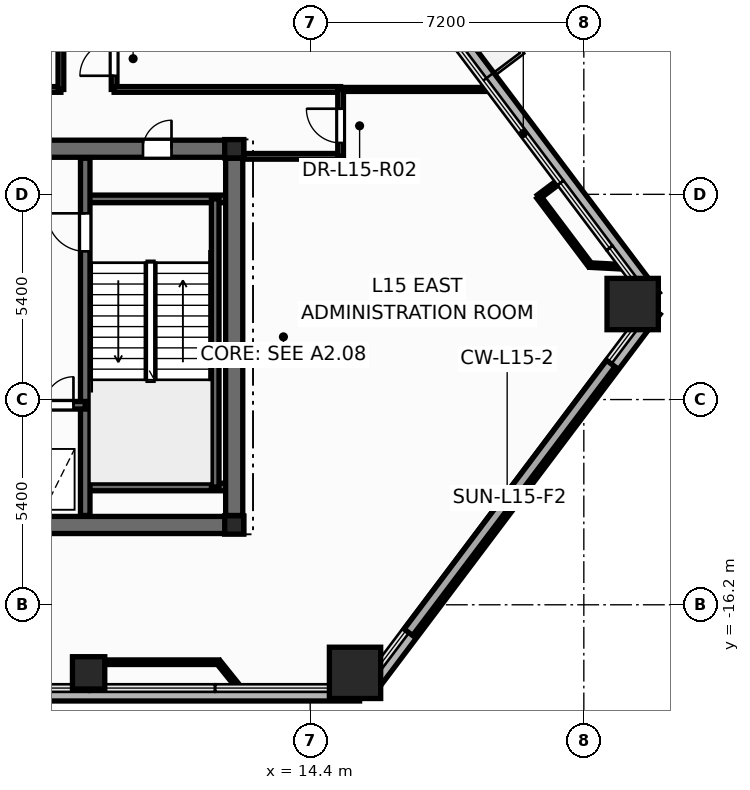
"""IFC4 building model, lengths in metres.
Left out: names, types, materials, properties, quantities, classifications, styles, units other than length and angle.
Written with IfcOpenShell. Run it as: python <this file> out.ifc"""

import sys

from ifc_helpers import new_model, si_unit, direction, frame, frame_2d, origin, origin_2d, place, context, subcontext, project, spatial, rectangle, hollow_rectangle, hollow_circle, i_section, extrude, element, fill, save


model = new_model("IFC4")
c1 = context("Model", 3, precision=1e-05, world=origin(), true_north=direction((0.0, 1.0)))
c2 = subcontext(c1, "Body", "Model", "MODEL_VIEW")
j1 = project(units=[si_unit("LENGTHUNIT", "METRE"), si_unit("PLANEANGLEUNIT", "RADIAN")], contexts=[c1])
p1 = place(None, origin())
s1 = spatial("IfcSite", under=j1, at=p1, CompositionType="ELEMENT")
p2 = place(p1, origin())
s2 = spatial("IfcBuilding", under=s1, at=p2, CompositionType="ELEMENT")
p3 = place(p2, frame((0.0, 0.0, 60.3)))
s3 = spatial("IfcBuildingStorey", under=s2, at=p3, CompositionType="ELEMENT", Elevation=60.3)
for number, where, z_axis, x_axis in (
    (1, (15.58, -17.991, 0.0), (0.0, 0.0, 1.0), (1.0, 0.0, 0.0)),
    (2, (22.885, -8.287, 0.0), (0.0, 0.0, 1.0), (1.0, 0.0, 0.0)),
):
    element("IfcColumn", number, at=place(p3, frame(where, z_axis=z_axis, x_axis=x_axis)), inside=s3, PredefinedType="COLUMN", context=c2, shape_type="SweptSolid", body=[
        extrude(hollow_rectangle(XDim=1.35, YDim=1.35, WallThickness=0.065, at=origin_2d()), origin(), (0.0, 0.0, 1.0), 4.5),
    ])
p4 = place(p3, frame((8.569, -17.991, 0.0), z_axis=(0.0, 0.0, 1.0), x_axis=(1.0, 0.0, 0.0)))
e3 = element("IfcColumn", 3, at=p4, inside=s3, PredefinedType="COLUMN", context=c2, shape_type="SweptSolid", body=[
    extrude(hollow_circle(Radius=0.425, WallThickness=0.038, at=origin_2d()), origin(), (0.0, 0.0, 1.0), 4.5),
])
for number, where, z_axis, x_axis in (
    (4, (12.4, -14.1, 0.0), (0.0, 0.0, 1.0), (1.0, 0.0, 0.0)),
    (5, (12.4, -4.2, 0.0), (0.0, 0.0, 1.0), (1.0, 0.0, 0.0)),
):
    element("IfcColumn", number, at=place(p3, frame(where, z_axis=z_axis, x_axis=x_axis)), inside=s3, PredefinedType="COLUMN", context=c2, shape_type="SweptSolid", body=[
        extrude(i_section(OverallWidth=0.5, OverallDepth=0.482, WebThickness=0.04, FlangeThickness=0.045, at=origin_2d()), origin(), (0.0, 0.0, 1.0), 4.5),
    ])
p5 = place(p3, frame((-15.699, -18.551, -0.2), z_axis=(0.0, 0.0, 1.0), x_axis=(1.0, 0.0, 0.0)))
e6 = element("IfcWall", 6, at=p5, inside=s3, PredefinedType="PARAPET", context=c2, shape_type="SweptSolid", body=[
    extrude(rectangle(XDim=31.398, YDim=0.36, at=frame_2d((15.699, 0.0))), origin(), (0.0, 0.0, 1.0), 0.38),
])
p6 = place(p3, frame((15.955, -18.423, -0.2), z_axis=(0.0, 0.0, 1.0), x_axis=(0.601450438874, 0.798910113579, 0.0)))
e7 = element("IfcWall", 7, at=p6, inside=s3, PredefinedType="PARAPET", context=c2, shape_type="SweptSolid", body=[
    extrude(rectangle(XDim=12.488, YDim=0.36, at=frame_2d((6.244, 0.0))), origin(), (0.0, 0.0, 1.0), 0.38),
])
p7 = place(p3, frame((23.442, -8.094, -0.2), z_axis=(0.0, 0.0, 1.0), x_axis=(-0.601441347289, 0.798916957994, 0.0)))
e8 = element("IfcWall", 8, at=p7, inside=s3, PredefinedType="PARAPET", context=c2, shape_type="SweptSolid", body=[
    extrude(rectangle(XDim=10.996, YDim=0.36, at=frame_2d((5.498, 0.0))), origin(), (0.0, 0.0, 1.0), 0.38),
])
p8 = place(p3, frame((-12.65, -14.1, 0.0), z_axis=(0.0, 0.0, 1.0), x_axis=(1.0, 0.0, 0.0)))
e9 = element("IfcWall", 9, at=p8, inside=s3, PredefinedType="SHEAR", context=c2, shape_type="SweptSolid", body=[
    extrude(rectangle(XDim=25.3, YDim=0.45, at=frame_2d((12.65, 0.0))), origin(), (0.0, 0.0, 1.0), 4.5),
])
p9 = place(p3, frame((-12.65, -4.2, 0.0), z_axis=(0.0, 0.0, 1.0), x_axis=(1.0, 0.0, 0.0)))
e10 = element("IfcWall", 10, at=p9, inside=s3, PredefinedType="SHEAR", context=c2, shape_type="SweptSolid", body=[
    extrude(rectangle(XDim=25.3, YDim=0.45, at=frame_2d((12.65, 0.0))), origin(), (0.0, 0.0, 1.0), 4.5),
])
p10 = place(p9, frame((1.85, 0.0, 0.0)))
e11 = element("IfcOpeningElement", 11, at=p10, cuts=e10, PredefinedType="OPENING", context=c2, shape_type="SweptSolid", body=[
    extrude(rectangle(XDim=0.756, YDim=2.054, at=frame_2d((0.375, 1.027))), frame((0.0, 0.235, 0.0), z_axis=(0.0, -1.0, 0.0), x_axis=(1.0, 0.0, 0.0)), (0.0, 0.0, 1.0), 0.47),
])
p11 = place(p9, frame((22.65, 0.0, 0.0)))
e12 = element("IfcOpeningElement", 12, at=p11, cuts=e10, PredefinedType="OPENING", context=c2, shape_type="SweptSolid", body=[
    extrude(rectangle(XDim=0.756, YDim=2.054, at=frame_2d((0.375, 1.027))), frame((0.0, 0.235, 0.0), z_axis=(0.0, -1.0, 0.0), x_axis=(1.0, 0.0, 0.0)), (0.0, 0.0, 1.0), 0.47),
])
p12 = place(p9, frame((5.85, 0.0, 0.0)))
e13 = element("IfcOpeningElement", 13, at=p12, cuts=e10, PredefinedType="OPENING", context=c2, shape_type="SweptSolid", body=[
    extrude(rectangle(XDim=1.006, YDim=2.104, at=frame_2d((0.5, 1.052))), frame((0.0, 0.235, 0.0), z_axis=(0.0, -1.0, 0.0), x_axis=(1.0, 0.0, 0.0)), (0.0, 0.0, 1.0), 0.47),
])
p13 = place(p9, frame((10.35, 0.0, 0.0)))
e14 = element("IfcOpeningElement", 14, at=p13, cuts=e10, PredefinedType="OPENING", context=c2, shape_type="SweptSolid", body=[
    extrude(rectangle(XDim=1.406, YDim=2.154, at=frame_2d((0.7, 1.077))), frame((0.0, 0.235, 0.0), z_axis=(0.0, -1.0, 0.0), x_axis=(1.0, 0.0, 0.0)), (0.0, 0.0, 1.0), 0.47),
])
p14 = place(p9, frame((18.45, 0.0, 0.0)))
e15 = element("IfcOpeningElement", 15, at=p14, cuts=e10, PredefinedType="OPENING", context=c2, shape_type="SweptSolid", body=[
    extrude(rectangle(XDim=1.006, YDim=2.104, at=frame_2d((0.5, 1.052))), frame((0.0, 0.235, 0.0), z_axis=(0.0, -1.0, 0.0), x_axis=(1.0, 0.0, 0.0)), (0.0, 0.0, 1.0), 0.47),
])
for number, where, z_axis, x_axis in (
    (16, (8.48, -5.52, 0.0), (0.0, 0.0, 1.0), (1.0, 0.0, 0.0)),
    (17, (8.48, -13.1, 0.0), (0.0, 0.0, 1.0), (1.0, 0.0, 0.0)),
):
    element("IfcWall", number, at=place(p3, frame(where, z_axis=z_axis, x_axis=x_axis)), inside=s3, PredefinedType="SOLIDWALL", context=c2, shape_type="SweptSolid", body=[
        extrude(rectangle(XDim=3.87, YDim=0.2, at=frame_2d((1.935, 0.0))), origin(), (0.0, 0.0, 1.0), 4.5),
    ])
p15 = place(p3, frame((11.9, -13.1, 0.0), z_axis=(0.0, 0.0, 1.0), x_axis=(0.0, 1.0, 0.0)))
e18 = element("IfcWall", 18, at=p15, inside=s3, PredefinedType="SOLIDWALL", context=c2, shape_type="SweptSolid", body=[
    extrude(rectangle(XDim=7.58, YDim=0.2, at=frame_2d((3.79, 0.0))), origin(), (0.0, 0.0, 1.0), 4.5),
])
p16 = place(p3, frame((8.48, -13.85, 0.0), z_axis=(0.0, 0.0, 1.0), x_axis=(0.0, 1.0, 0.0)))
e19 = element("IfcWall", 19, at=p16, inside=s3, PredefinedType="SHEAR", context=c2, shape_type="SweptSolid", body=[
    extrude(rectangle(XDim=9.4, YDim=0.25, at=frame_2d((4.7, 0.0))), origin(), (0.0, 0.0, 1.0), 4.5),
])
p17 = place(p16, frame((6.95, 0.0, 0.0)))
e20 = element("IfcOpeningElement", 20, at=p17, cuts=e19, PredefinedType="OPENING", context=c2, shape_type="SweptSolid", body=[
    extrude(rectangle(XDim=1.006, YDim=2.104, at=frame_2d((0.5, 1.052))), frame((0.0, 0.135, 0.0), z_axis=(0.0, -1.0, 0.0), x_axis=(1.0, 0.0, 0.0)), (0.0, 0.0, 1.0), 0.27),
])
p18 = place(p3, frame((5.12, -10.95, 0.0), z_axis=(0.0, 0.0, 1.0), x_axis=(1.0, 0.0, 0.0)))
e21 = element("IfcWall", 21, at=p18, inside=s3, PredefinedType="SOLIDWALL", context=c2, shape_type="SweptSolid", body=[
    extrude(rectangle(XDim=3.36, YDim=0.2, at=frame_2d((1.68, 0.0))), origin(), (0.0, 0.0, 1.0), 4.5),
])
p19 = place(p18, frame((0.42, 0.0, 0.0)))
e22 = element("IfcOpeningElement", 22, at=p19, cuts=e21, PredefinedType="OPENING", context=c2, shape_type="SweptSolid", body=[
    extrude(rectangle(XDim=1.106, YDim=2.104, at=frame_2d((0.55, 1.052))), frame((0.0, 0.11, 0.0), z_axis=(0.0, -1.0, 0.0), x_axis=(1.0, 0.0, 0.0)), (0.0, 0.0, 1.0), 0.22),
])
p20 = place(p18, frame((2.3, 0.0, 0.0)))
e23 = element("IfcOpeningElement", 23, at=p20, cuts=e21, PredefinedType="OPENING", context=c2, shape_type="SweptSolid", body=[
    extrude(rectangle(XDim=0.756, YDim=2.054, at=frame_2d((0.375, 1.027))), frame((0.0, 0.11, 0.0), z_axis=(0.0, -1.0, 0.0), x_axis=(1.0, 0.0, 0.0)), (0.0, 0.0, 1.0), 0.22),
])
p21 = place(p3, frame((12.4, -13.85, 0.0), z_axis=(0.0, 0.0, 1.0), x_axis=(0.0, 1.0, 0.0)))
e24 = element("IfcWall", 24, at=p21, inside=s3, PredefinedType="SHEAR", context=c2, shape_type="SweptSolid", body=[
    extrude(rectangle(XDim=9.4, YDim=0.45, at=frame_2d((4.7, 0.0))), origin(), (0.0, 0.0, 1.0), 4.5),
])
p22 = place(p3, frame((9.24, -2.64, 0.0), z_axis=(0.0, 0.0, 1.0), x_axis=(0.0, 1.0, 0.0)))
e25 = element("IfcWall", 25, at=p22, inside=s3, PredefinedType="PARTITIONING", context=c2, shape_type="SweptSolid", body=[
    extrude(rectangle(XDim=12.06, YDim=0.15, at=frame_2d((6.03, 0.0))), origin(), (0.0, 0.0, 1.0), 3.409),
])
p23 = place(p22, frame((0.36, 0.0, 0.0)))
e26 = element("IfcOpeningElement", 26, at=p23, cuts=e25, PredefinedType="OPENING", context=c2, shape_type="SweptSolid", body=[
    extrude(rectangle(XDim=0.906, YDim=2.104, at=frame_2d((0.45, 1.052))), frame((0.0, 0.085, 0.0), z_axis=(0.0, -1.0, 0.0), x_axis=(1.0, 0.0, 0.0)), (0.0, 0.0, 1.0), 0.17),
])
p24 = place(p3, frame((9.24, -2.64, 0.0), z_axis=(0.0, 0.0, 1.0), x_axis=(1.0, 0.0, 0.0)))
e27 = element("IfcWall", 27, at=p24, inside=s3, PredefinedType="PARTITIONING", context=c2, shape_type="SweptSolid", body=[
    extrude(rectangle(XDim=5.96, YDim=0.15, at=frame_2d((2.98, 0.0))), origin(), (0.0, 0.0, 1.0), 4.25),
])
p25 = place(p3, frame((15.2, -2.64, 0.0), z_axis=(0.0, 0.0, 1.0), x_axis=(1.0, 0.0, 0.0)))
e28 = element("IfcWall", 28, at=p25, inside=s3, PredefinedType="PARTITIONING", context=c2, shape_type="SweptSolid", body=[
    extrude(rectangle(XDim=3.935, YDim=0.105, at=frame_2d((1.968, 0.0))), origin(), (0.0, 0.0, 1.0), 3.613),
])
p26 = place(p3, frame((4.14, -2.64, 0.0), z_axis=(0.0, 0.0, 1.0), x_axis=(1.0, 0.0, 0.0)))
e29 = element("IfcWall", 29, at=p26, inside=s3, PredefinedType="PARTITIONING", context=c2, shape_type="SweptSolid", body=[
    extrude(rectangle(XDim=3.7, YDim=0.15, at=frame_2d((1.85, 0.0))), origin(), (0.0, 0.0, 1.0), 3.225),
])
p27 = place(p26, frame((0.396, 0.0, 0.0)))
e30 = element("IfcOpeningElement", 30, at=p27, cuts=e29, PredefinedType="OPENING", context=c2, shape_type="SweptSolid", body=[
    extrude(rectangle(XDim=0.906, YDim=2.104, at=frame_2d((0.45, 1.052))), frame((0.0, 0.085, 0.0), z_axis=(0.0, -1.0, 0.0), x_axis=(1.0, 0.0, 0.0)), (0.0, 0.0, 1.0), 0.17),
])
p28 = place(p3, frame((8.5, -17.711, 0.0), z_axis=(0.0, 0.0, 1.0), x_axis=(1.0, 0.0, 0.0)))
e31 = element("IfcWall", 31, at=p28, inside=s3, PredefinedType="PARTITIONING", context=c2, shape_type="SweptSolid", body=[
    extrude(rectangle(XDim=3.486, YDim=0.12, at=frame_2d((1.743, 0.0))), origin(), (0.0, 0.0, 1.0), 3.613),
])
p29 = place(p3, frame((12.652, -4.4, 0.0), z_axis=(0.0, 0.0, 1.0), x_axis=(1.0, 0.0, 0.0)))
e32 = element("IfcWall", 32, at=p29, inside=s3, PredefinedType="PARTITIONING", context=c2, shape_type="SweptSolid", body=[
    extrude(rectangle(XDim=2.548, YDim=0.15, at=frame_2d((1.274, 0.0))), origin(), (0.0, 0.0, 1.0), 3.225),
])
p30 = place(p3, frame((7.84, -2.64, 0.0), z_axis=(0.0, 0.0, 1.0), x_axis=(0.0, 1.0, 0.0)))
e33 = element("IfcWall", 33, at=p30, inside=s3, PredefinedType="PARTITIONING", context=c2, shape_type="SweptSolid", body=[
    extrude(rectangle(XDim=2.538, YDim=0.15, at=frame_2d((1.269, 0.0))), origin(), (0.0, 0.0, 1.0), 4.25),
])
p31 = place(p3, frame((21.763, -7.262, 0.0), z_axis=(0.0, 0.0, 1.0), x_axis=(-0.601459454583, 0.798903326124, 0.0)))
e34 = element("IfcWall", 34, at=p31, inside=s3, PredefinedType="PARTITIONING", context=c2, shape_type="SweptSolid", body=[
    extrude(rectangle(XDim=2.247, YDim=0.12, at=frame_2d((1.124, 0.0))), origin(), (0.0, 0.0, 1.0), 4.25),
])
p32 = place(p3, frame((15.2, -4.4, 0.0), z_axis=(0.0, 0.0, 1.0), x_axis=(0.0, 1.0, 0.0)))
e35 = element("IfcWall", 35, at=p32, inside=s3, PredefinedType="PARTITIONING", context=c2, shape_type="SweptSolid", body=[
    extrude(rectangle(XDim=1.76, YDim=0.15, at=frame_2d((0.88, 0.0))), origin(), (0.0, 0.0, 1.0), 4.25),
])
p33 = place(p32, frame((0.353, 0.0, 0.0)))
e36 = element("IfcOpeningElement", 36, at=p33, cuts=e35, PredefinedType="OPENING", context=c2, shape_type="SweptSolid", body=[
    extrude(rectangle(XDim=0.906, YDim=2.104, at=frame_2d((0.45, 1.052))), frame((0.0, 0.085, 0.0), z_axis=(0.0, -1.0, 0.0), x_axis=(1.0, 0.0, 0.0)), (0.0, 0.0, 1.0), 0.17),
])
p34 = place(p3, frame((22.636, -7.308, 0.0), z_axis=(0.0, 0.0, 1.0), x_axis=(-0.998620143289, 0.052514849493, 0.0)))
e37 = element("IfcWall", 37, at=p34, inside=s3, PredefinedType="PARTITIONING", context=c2, shape_type="SweptSolid", body=[
    extrude(rectangle(XDim=0.874, YDim=0.12, at=frame_2d((0.437, 0.0))), origin(), (0.0, 0.0, 1.0), 3.613),
])
p35 = place(p3, frame((11.987, -17.711, 0.0), z_axis=(0.0, 0.0, 1.0), x_axis=(0.625699909671, -0.780063858308, 0.0)))
e38 = element("IfcWall", 38, at=p35, inside=s3, PredefinedType="PARTITIONING", context=c2, shape_type="SweptSolid", body=[
    extrude(rectangle(XDim=0.859, YDim=0.12, at=frame_2d((0.429, 0.0))), origin(), (0.0, 0.0, 1.0), 3.613),
])
for number, where, z_axis, x_axis in (
    (39, (8.5, -18.381, 0.0), (0.0, 0.0, 1.0), (0.0, 1.0, 0.0)),
    (40, (20.412, -5.467, 0.0), (0.0, 0.0, 1.0), (0.799, 0.602, 0.0)),
):
    element("IfcWall", number, at=place(p3, frame(where, z_axis=z_axis, x_axis=x_axis)), inside=s3, PredefinedType="PARTITIONING", context=c2, shape_type="SweptSolid", body=[
        extrude(rectangle(XDim=0.67, YDim=0.12, at=frame_2d((0.335, 0.0))), origin(), (0.0, 0.0, 1.0), 3.613),
    ])
p36 = place(p17, origin())
e41 = element("IfcDoor", 41, at=p36, inside=s3, OperationType="SINGLE_SWING_RIGHT", PredefinedType="DOOR", context=c2, shape_type="SweptSolid", body=[
    extrude(rectangle(XDim=1.0, YDim=2.1, at=frame_2d((0.5, 1.05))), frame((0.0, 0.025, 0.0), z_axis=(0.0, -1.0, 0.0), x_axis=(1.0, 0.0, 0.0)), (0.0, 0.0, 1.0), 0.05),
])
fill(e20, e41)
p37 = place(p20, origin())
e42 = element("IfcDoor", 42, at=p37, inside=s3, OperationType="SINGLE_SWING_RIGHT", PredefinedType="DOOR", context=c2, shape_type="SweptSolid", body=[
    extrude(rectangle(XDim=0.75, YDim=2.05, at=frame_2d((0.375, 1.025))), frame((0.0, 0.025, 0.0), z_axis=(0.0, -1.0, 0.0), x_axis=(1.0, 0.0, 0.0)), (0.0, 0.0, 1.0), 0.05),
])
fill(e23, e42)
p38 = place(p11, origin())
e43 = element("IfcDoor", 43, at=p38, inside=s3, OperationType="SINGLE_SWING_RIGHT", PredefinedType="DOOR", context=c2, shape_type="SweptSolid", body=[
    extrude(rectangle(XDim=0.75, YDim=2.05, at=frame_2d((0.375, 1.025))), frame((0.0, 0.025, 0.0), z_axis=(0.0, -1.0, 0.0), x_axis=(1.0, 0.0, 0.0)), (0.0, 0.0, 1.0), 0.05),
])
fill(e12, e43)
p39 = place(p33, origin())
e44 = element("IfcDoor", 44, at=p39, inside=s3, OperationType="SINGLE_SWING_RIGHT", PredefinedType="DOOR", context=c2, shape_type="SweptSolid", body=[
    extrude(rectangle(XDim=0.9, YDim=2.1, at=frame_2d((0.45, 1.05))), frame((0.0, 0.025, 0.0), z_axis=(0.0, -1.0, 0.0), x_axis=(1.0, 0.0, 0.0)), (0.0, 0.0, 1.0), 0.05),
])
fill(e36, e44)
p40 = place(p23, origin())
e45 = element("IfcDoor", 45, at=p40, inside=s3, OperationType="SINGLE_SWING_LEFT", PredefinedType="DOOR", context=c2, shape_type="SweptSolid", body=[
    extrude(rectangle(XDim=0.9, YDim=2.1, at=frame_2d((0.45, 1.05))), frame((0.0, 0.025, 0.0), z_axis=(0.0, -1.0, 0.0), x_axis=(1.0, 0.0, 0.0)), (0.0, 0.0, 1.0), 0.05),
])
fill(e26, e45)
save(model, sys.argv[1])
